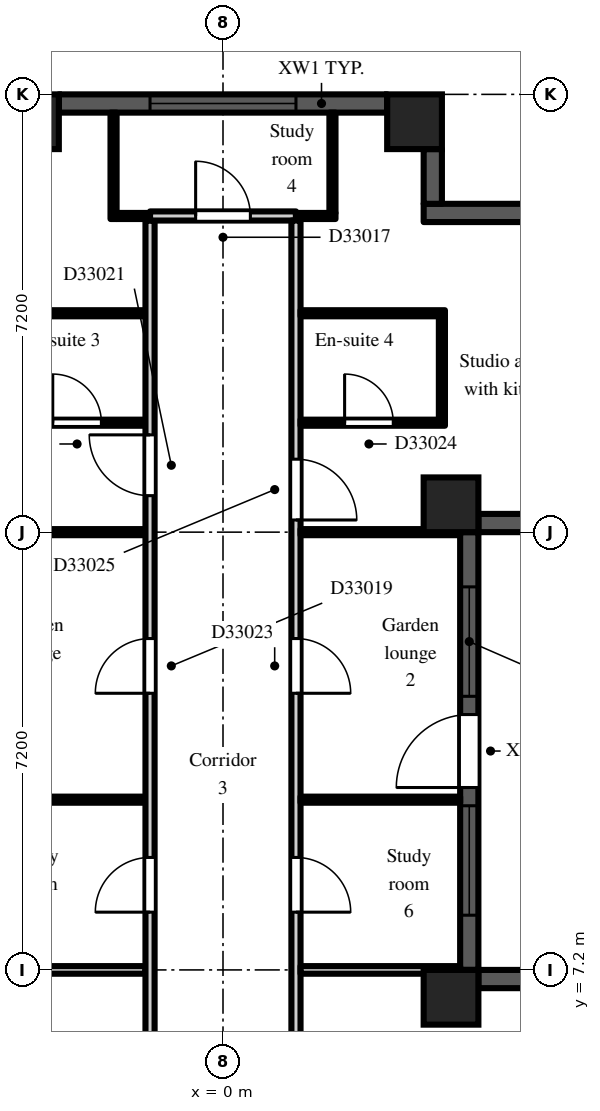
"""IFC4 building model, lengths in metres.
Left out: names, types, materials, properties, quantities, classifications, styles, units other than length and angle.
Written with IfcOpenShell. Run it as: python <this file> out.ifc"""

import sys

from ifc_helpers import new_model, si_unit, direction, frame, frame_2d, origin, origin_2d, place, context, subcontext, project, spatial, rectangle, extrude, element, fill, save


model = new_model("IFC4")
c1 = context("Model", 3, precision=1e-05, world=origin(), true_north=direction((0.0, 1.0)))
c2 = subcontext(c1, "Body", "Model", "MODEL_VIEW")
j1 = project(units=[si_unit("LENGTHUNIT", "METRE"), si_unit("PLANEANGLEUNIT", "RADIAN")], contexts=[c1])
p1 = place(None, origin())
s1 = spatial("IfcSite", under=j1, at=p1, CompositionType="ELEMENT")
p2 = place(p1, origin())
s2 = spatial("IfcBuilding", under=s1, at=p2, CompositionType="ELEMENT")
p3 = place(p2, frame((0.0, 0.0, 231.9)))
s3 = spatial("IfcBuildingStorey", under=s2, at=p3, CompositionType="ELEMENT", Elevation=231.9)
for number, where, z_axis, x_axis in (
    (1, (-3.15, 21.15, 0.0), (0.0, 0.0, 1.0), (1.0, 0.0, 0.0)),
    (2, (3.15, 21.15, 0.0), (0.0, 0.0, 1.0), (1.0, 0.0, 0.0)),
    (3, (3.75, 6.75, 0.0), (0.0, 0.0, 1.0), (1.0, 0.0, 0.0)),
    (4, (3.75, 14.85, 0.0), (0.0, 0.0, 1.0), (1.0, 0.0, 0.0)),
):
    element("IfcColumn", number, at=place(p3, frame(where, z_axis=z_axis, x_axis=x_axis)), inside=s3, PredefinedType="COLUMN", context=c2, shape_type="SweptSolid", body=[
        extrude(rectangle(XDim=0.9, YDim=0.9, at=origin_2d()), origin(), (0.0, 0.0, 1.0), 3.0),
    ])
p4 = place(p3, frame((7.2, 7.05, 0.0), z_axis=(0.0, 0.0, 1.0), x_axis=(-1.0, 0.0, 0.0)))
e5 = element("IfcWall", 5, at=p4, inside=s3, PredefinedType="SOLIDWALL", context=c2, shape_type="SweptSolid", body=[
    extrude(rectangle(XDim=3.0, YDim=0.3, at=frame_2d((1.5, 0.0))), origin(), (0.0, 0.0, 1.0), 2.3),
])
p5 = place(p3, frame((4.05, 7.2, 0.0), z_axis=(0.0, 0.0, 1.0), x_axis=(0.0, 1.0, 0.0)))
e6 = element("IfcWall", 6, at=p5, inside=s3, PredefinedType="SOLIDWALL", context=c2, shape_type="SweptSolid", body=[
    extrude(rectangle(XDim=7.2, YDim=0.3, at=frame_2d((3.6, 0.0))), origin(), (0.0, 0.0, 1.0), 2.3),
])
p6 = place(p5, frame((3.0, 0.0, 0.0)))
e7 = element("IfcOpeningElement", 7, at=p6, cuts=e6, PredefinedType="OPENING", context=c2, shape_type="SweptSolid", body=[
    extrude(rectangle(XDim=1.2, YDim=2.05, at=frame_2d((0.6, 1.025))), frame((0.0, 0.16, 0.0), z_axis=(0.0, -1.0, 0.0), x_axis=(1.0, 0.0, 0.0)), (0.0, 0.0, 1.0), 0.32),
])
p7 = place(p5, frame((0.9, 0.0, 0.2)))
e8 = element("IfcOpeningElement", 8, at=p7, cuts=e6, PredefinedType="OPENING", context=c2, shape_type="SweptSolid", body=[
    extrude(rectangle(XDim=1.8, YDim=1.85, at=frame_2d((0.9, 0.925))), frame((0.0, 0.16, 0.0), z_axis=(0.0, -1.0, 0.0), x_axis=(1.0, 0.0, 0.0)), (0.0, 0.0, 1.0), 0.32),
])
p8 = place(p5, frame((4.5, 0.0, 0.2)))
e9 = element("IfcOpeningElement", 9, at=p8, cuts=e6, PredefinedType="OPENING", context=c2, shape_type="SweptSolid", body=[
    extrude(rectangle(XDim=1.8, YDim=1.85, at=frame_2d((0.9, 0.925))), frame((0.0, 0.16, 0.0), z_axis=(0.0, -1.0, 0.0), x_axis=(1.0, 0.0, 0.0)), (0.0, 0.0, 1.0), 0.32),
])
p9 = place(p3, frame((4.2, 14.55, 0.0), z_axis=(0.0, 0.0, 1.0), x_axis=(1.0, 0.0, 0.0)))
e10 = element("IfcWall", 10, at=p9, inside=s3, PredefinedType="SOLIDWALL", context=c2, shape_type="SweptSolid", body=[
    extrude(rectangle(XDim=2.1, YDim=0.3, at=frame_2d((1.05, 0.0))), origin(), (0.0, 0.0, 1.0), 2.3),
])
p10 = place(p3, frame((5.1, 19.65, 0.0), z_axis=(0.0, 0.0, 1.0), x_axis=(-1.0, 0.0, 0.0)))
e11 = element("IfcWall", 11, at=p10, inside=s3, PredefinedType="SOLIDWALL", context=c2, shape_type="SweptSolid", body=[
    extrude(rectangle(XDim=1.8, YDim=0.3, at=frame_2d((0.9, 0.0))), origin(), (0.0, 0.0, 1.0), 2.6),
])
p11 = place(p3, frame((3.45, 19.8, 0.0), z_axis=(0.0, 0.0, 1.0), x_axis=(0.0, 1.0, 0.0)))
e12 = element("IfcWall", 12, at=p11, inside=s3, PredefinedType="SOLIDWALL", context=c2, shape_type="SweptSolid", body=[
    extrude(rectangle(XDim=0.9, YDim=0.3, at=frame_2d((0.45, 0.0))), origin(), (0.0, 0.0, 1.0), 2.6),
])
p12 = place(p3, frame((2.7, 21.45, 0.0), z_axis=(0.0, 0.0, 1.0), x_axis=(-1.0, 0.0, 0.0)))
e13 = element("IfcWall", 13, at=p12, inside=s3, PredefinedType="SOLIDWALL", context=c2, shape_type="SweptSolid", body=[
    extrude(rectangle(XDim=5.4, YDim=0.3, at=frame_2d((2.7, 0.0))), origin(), (0.0, 0.0, 1.0), 2.3),
])
p13 = place(p12, frame((1.5, 0.0, 0.2)))
e14 = element("IfcOpeningElement", 14, at=p13, cuts=e13, PredefinedType="OPENING", context=c2, shape_type="SweptSolid", body=[
    extrude(rectangle(XDim=2.4, YDim=1.85, at=frame_2d((1.2, 0.925))), frame((0.0, 0.16, 0.0), z_axis=(0.0, -1.0, 0.0), x_axis=(1.0, 0.0, 0.0)), (0.0, 0.0, 1.0), 0.32),
])
p14 = place(p3, frame((-3.9, 7.2, 0.0), z_axis=(0.0, 0.0, 1.0), x_axis=(1.0, 0.0, 0.0)))
e15 = element("IfcWall", 15, at=p14, inside=s3, PredefinedType="PARTITIONING", context=c2, shape_type="SweptSolid", body=[
    extrude(rectangle(XDim=2.625, YDim=0.125, at=frame_2d((1.312, 0.0))), origin(), (0.0, 0.0, 1.0), 2.6),
])
for number, where, z_axis, x_axis in (
    (16, (-3.9, 10.0, 0.0), (0.0, 0.0, 1.0), (1.0, 0.0, 0.0)),
    (17, (-3.9, 14.4, 0.0), (0.0, 0.0, 1.0), (1.0, 0.0, 0.0)),
):
    element("IfcWall", number, at=place(p3, frame(where, z_axis=z_axis, x_axis=x_axis)), inside=s3, PredefinedType="PARTITIONING", context=c2, shape_type="SweptSolid", body=[
        extrude(rectangle(XDim=2.625, YDim=0.1, at=frame_2d((1.312, 0.0))), origin(), (0.0, 0.0, 1.0), 2.6),
    ])
p15 = place(p3, frame((-3.55, 16.2, 0.0), z_axis=(0.0, 0.0, 1.0), x_axis=(1.0, 0.0, 0.0)))
e18 = element("IfcWall", 18, at=p15, inside=s3, PredefinedType="PARTITIONING", context=c2, shape_type="SweptSolid", body=[
    extrude(rectangle(XDim=2.275, YDim=0.1, at=frame_2d((1.138, 0.0))), origin(), (0.0, 0.0, 1.0), 2.6),
])
p16 = place(p15, frame((0.75, 0.0, 0.0)))
e19 = element("IfcOpeningElement", 19, at=p16, cuts=e18, PredefinedType="OPENING", context=c2, shape_type="SweptSolid", body=[
    extrude(rectangle(XDim=0.8, YDim=2.1, at=frame_2d((0.4, 1.05))), frame((0.0, 0.06, 0.0), z_axis=(0.0, -1.0, 0.0), x_axis=(1.0, 0.0, 0.0)), (0.0, 0.0, 1.0), 0.12),
])
p17 = place(p3, frame((-3.55, 18.0, 0.0), z_axis=(0.0, 0.0, 1.0), x_axis=(1.0, 0.0, 0.0)))
e20 = element("IfcWall", 20, at=p17, inside=s3, PredefinedType="PARTITIONING", context=c2, shape_type="SweptSolid", body=[
    extrude(rectangle(XDim=2.275, YDim=0.1, at=frame_2d((1.138, 0.0))), origin(), (0.0, 0.0, 1.0), 2.6),
])
p18 = place(p3, frame((-1.8, 19.55, 0.0), z_axis=(0.0, 0.0, 1.0), x_axis=(0.0, 1.0, 0.0)))
e21 = element("IfcWall", 21, at=p18, inside=s3, PredefinedType="PARTITIONING", context=c2, shape_type="SweptSolid", body=[
    extrude(rectangle(XDim=1.75, YDim=0.1, at=frame_2d((0.875, 0.0))), origin(), (0.0, 0.0, 1.0), 2.6),
])
p19 = place(p3, frame((-1.75, 19.6, 0.0), z_axis=(0.0, 0.0, 1.0), x_axis=(1.0, 0.0, 0.0)))
e22 = element("IfcWall", 22, at=p19, inside=s3, PredefinedType="PARTITIONING", context=c2, shape_type="SweptSolid", body=[
    extrude(rectangle(XDim=0.55, YDim=0.1, at=frame_2d((0.275, 0.0))), origin(), (0.0, 0.0, 1.0), 2.6),
])
p20 = place(p3, frame((-1.2, 1.275, 0.0), z_axis=(0.0, 0.0, 1.0), x_axis=(0.0, 1.0, 0.0)))
e23 = element("IfcWall", 23, at=p20, inside=s3, PredefinedType="PARTITIONING", context=c2, shape_type="SweptSolid", body=[
    extrude(rectangle(XDim=18.25, YDim=0.15, at=frame_2d((9.125, 0.0))), origin(), (0.0, 0.0, 1.0), 2.6),
])
p21 = place(p20, frame((0.675, 0.0, 0.0)))
e24 = element("IfcOpeningElement", 24, at=p21, cuts=e23, PredefinedType="OPENING", context=c2, shape_type="SweptSolid", body=[
    extrude(rectangle(XDim=0.9, YDim=2.1, at=frame_2d((0.45, 1.05))), frame((0.0, 0.085, 0.0), z_axis=(0.0, -1.0, 0.0), x_axis=(1.0, 0.0, 0.0)), (0.0, 0.0, 1.0), 0.17),
])
p22 = place(p20, frame((3.675, 0.0, 0.0)))
e25 = element("IfcOpeningElement", 25, at=p22, cuts=e23, PredefinedType="OPENING", context=c2, shape_type="SweptSolid", body=[
    extrude(rectangle(XDim=0.9, YDim=2.1, at=frame_2d((0.45, 1.05))), frame((0.0, 0.085, 0.0), z_axis=(0.0, -1.0, 0.0), x_axis=(1.0, 0.0, 0.0)), (0.0, 0.0, 1.0), 0.17),
])
p23 = place(p20, frame((6.875, 0.0, 0.0)))
e26 = element("IfcOpeningElement", 26, at=p23, cuts=e23, PredefinedType="OPENING", context=c2, shape_type="SweptSolid", body=[
    extrude(rectangle(XDim=0.9, YDim=2.1, at=frame_2d((0.45, 1.05))), frame((0.0, 0.085, 0.0), z_axis=(0.0, -1.0, 0.0), x_axis=(1.0, 0.0, 0.0)), (0.0, 0.0, 1.0), 0.17),
])
p24 = place(p20, frame((10.475, 0.0, 0.0)))
e27 = element("IfcOpeningElement", 27, at=p24, cuts=e23, PredefinedType="OPENING", context=c2, shape_type="SweptSolid", body=[
    extrude(rectangle(XDim=0.9, YDim=2.1, at=frame_2d((0.45, 1.05))), frame((0.0, 0.085, 0.0), z_axis=(0.0, -1.0, 0.0), x_axis=(1.0, 0.0, 0.0)), (0.0, 0.0, 1.0), 0.17),
])
p25 = place(p20, frame((13.725, 0.0, 0.0)))
e28 = element("IfcOpeningElement", 28, at=p25, cuts=e23, PredefinedType="OPENING", context=c2, shape_type="SweptSolid", body=[
    extrude(rectangle(XDim=1.0, YDim=2.1, at=frame_2d((0.5, 1.05))), frame((0.0, 0.085, 0.0), z_axis=(0.0, -1.0, 0.0), x_axis=(1.0, 0.0, 0.0)), (0.0, 0.0, 1.0), 0.17),
])
p26 = place(p3, frame((-1.2, 19.6, 0.0), z_axis=(0.0, 0.0, 1.0), x_axis=(1.0, 0.0, 0.0)))
e29 = element("IfcWall", 29, at=p26, inside=s3, PredefinedType="PARTITIONING", context=c2, shape_type="SweptSolid", body=[
    extrude(rectangle(XDim=2.4, YDim=0.15, at=frame_2d((1.2, 0.0))), origin(), (0.0, 0.0, 1.0), 2.6),
])
p27 = place(p26, frame((0.75, 0.0, 0.0)))
e30 = element("IfcOpeningElement", 30, at=p27, cuts=e29, PredefinedType="OPENING", context=c2, shape_type="SweptSolid", body=[
    extrude(rectangle(XDim=0.9, YDim=2.1, at=frame_2d((0.45, 1.05))), frame((0.0, 0.085, 0.0), z_axis=(0.0, -1.0, 0.0), x_axis=(1.0, 0.0, 0.0)), (0.0, 0.0, 1.0), 0.17),
])
p28 = place(p3, frame((1.2, 1.125, 0.0), z_axis=(0.0, 0.0, 1.0), x_axis=(0.0, 1.0, 0.0)))
e31 = element("IfcWall", 31, at=p28, inside=s3, PredefinedType="PARTITIONING", context=c2, shape_type="SweptSolid", body=[
    extrude(rectangle(XDim=18.4, YDim=0.15, at=frame_2d((9.2, 0.0))), origin(), (0.0, 0.0, 1.0), 2.6),
])
p29 = place(p28, frame((2.625, 0.0, 0.0)))
e32 = element("IfcOpeningElement", 32, at=p29, cuts=e31, PredefinedType="OPENING", context=c2, shape_type="SweptSolid", body=[
    extrude(rectangle(XDim=0.9, YDim=2.1, at=frame_2d((0.45, 1.05))), frame((0.0, 0.085, 0.0), z_axis=(0.0, -1.0, 0.0), x_axis=(1.0, 0.0, 0.0)), (0.0, 0.0, 1.0), 0.17),
])
p30 = place(p28, frame((7.025, 0.0, 0.0)))
e33 = element("IfcOpeningElement", 33, at=p30, cuts=e31, PredefinedType="OPENING", context=c2, shape_type="SweptSolid", body=[
    extrude(rectangle(XDim=0.9, YDim=2.1, at=frame_2d((0.45, 1.05))), frame((0.0, 0.085, 0.0), z_axis=(0.0, -1.0, 0.0), x_axis=(1.0, 0.0, 0.0)), (0.0, 0.0, 1.0), 0.17),
])
p31 = place(p28, frame((10.625, 0.0, 0.0)))
e34 = element("IfcOpeningElement", 34, at=p31, cuts=e31, PredefinedType="OPENING", context=c2, shape_type="SweptSolid", body=[
    extrude(rectangle(XDim=0.9, YDim=2.1, at=frame_2d((0.45, 1.05))), frame((0.0, 0.085, 0.0), z_axis=(0.0, -1.0, 0.0), x_axis=(1.0, 0.0, 0.0)), (0.0, 0.0, 1.0), 0.17),
])
p32 = place(p28, frame((13.475, 0.0, 0.0)))
e35 = element("IfcOpeningElement", 35, at=p32, cuts=e31, PredefinedType="OPENING", context=c2, shape_type="SweptSolid", body=[
    extrude(rectangle(XDim=1.0, YDim=2.1, at=frame_2d((0.5, 1.05))), frame((0.0, 0.085, 0.0), z_axis=(0.0, -1.0, 0.0), x_axis=(1.0, 0.0, 0.0)), (0.0, 0.0, 1.0), 0.17),
])
p33 = place(p3, frame((1.275, 7.2, 0.0), z_axis=(0.0, 0.0, 1.0), x_axis=(1.0, 0.0, 0.0)))
e36 = element("IfcWall", 36, at=p33, inside=s3, PredefinedType="PARTITIONING", context=c2, shape_type="SweptSolid", body=[
    extrude(rectangle(XDim=2.625, YDim=0.125, at=frame_2d((1.312, 0.0))), origin(), (0.0, 0.0, 1.0), 2.6),
])
for number, where, z_axis, x_axis in (
    (37, (1.275, 10.0, 0.0), (0.0, 0.0, 1.0), (1.0, 0.0, 0.0)),
    (38, (1.275, 14.4, 0.0), (0.0, 0.0, 1.0), (1.0, 0.0, 0.0)),
):
    element("IfcWall", number, at=place(p3, frame(where, z_axis=z_axis, x_axis=x_axis)), inside=s3, PredefinedType="PARTITIONING", context=c2, shape_type="SweptSolid", body=[
        extrude(rectangle(XDim=2.625, YDim=0.1, at=frame_2d((1.312, 0.0))), origin(), (0.0, 0.0, 1.0), 2.6),
    ])
p34 = place(p3, frame((1.275, 16.2, 0.0), z_axis=(0.0, 0.0, 1.0), x_axis=(1.0, 0.0, 0.0)))
e39 = element("IfcWall", 39, at=p34, inside=s3, PredefinedType="PARTITIONING", context=c2, shape_type="SweptSolid", body=[
    extrude(rectangle(XDim=2.375, YDim=0.1, at=frame_2d((1.188, 0.0))), origin(), (0.0, 0.0, 1.0), 2.6),
])
p35 = place(p34, frame((0.725, 0.0, 0.0)))
e40 = element("IfcOpeningElement", 40, at=p35, cuts=e39, PredefinedType="OPENING", context=c2, shape_type="SweptSolid", body=[
    extrude(rectangle(XDim=0.8, YDim=2.1, at=frame_2d((0.4, 1.05))), frame((0.0, 0.06, 0.0), z_axis=(0.0, -1.0, 0.0), x_axis=(1.0, 0.0, 0.0)), (0.0, 0.0, 1.0), 0.12),
])
p36 = place(p3, frame((1.275, 18.0, 0.0), z_axis=(0.0, 0.0, 1.0), x_axis=(1.0, 0.0, 0.0)))
e41 = element("IfcWall", 41, at=p36, inside=s3, PredefinedType="PARTITIONING", context=c2, shape_type="SweptSolid", body=[
    extrude(rectangle(XDim=2.375, YDim=0.1, at=frame_2d((1.188, 0.0))), origin(), (0.0, 0.0, 1.0), 2.6),
])
p37 = place(p3, frame((1.2, 19.6, 0.0), z_axis=(0.0, 0.0, 1.0), x_axis=(1.0, 0.0, 0.0)))
e42 = element("IfcWall", 42, at=p37, inside=s3, PredefinedType="PARTITIONING", context=c2, shape_type="SweptSolid", body=[
    extrude(rectangle(XDim=0.65, YDim=0.1, at=frame_2d((0.325, 0.0))), origin(), (0.0, 0.0, 1.0), 2.6),
])
p38 = place(p3, frame((1.8, 19.65, 0.0), z_axis=(0.0, 0.0, 1.0), x_axis=(0.0, 1.0, 0.0)))
e43 = element("IfcWall", 43, at=p38, inside=s3, PredefinedType="PARTITIONING", context=c2, shape_type="SweptSolid", body=[
    extrude(rectangle(XDim=1.65, YDim=0.1, at=frame_2d((0.825, 0.0))), origin(), (0.0, 0.0, 1.0), 2.6),
])
p39 = place(p3, frame((3.6, 16.25, 0.0), z_axis=(0.0, 0.0, 1.0), x_axis=(0.0, 1.0, 0.0)))
e44 = element("IfcWall", 44, at=p39, inside=s3, PredefinedType="PARTITIONING", context=c2, shape_type="SweptSolid", body=[
    extrude(rectangle(XDim=1.7, YDim=0.1, at=frame_2d((0.85, 0.0))), origin(), (0.0, 0.0, 1.0), 2.6),
])
p40 = place(p6, origin())
e45 = element("IfcDoor", 45, at=p40, inside=s3, OperationType="SINGLE_SWING_LEFT", PredefinedType="DOOR", context=c2, shape_type="SweptSolid", body=[
    extrude(rectangle(XDim=1.2, YDim=2.05, at=frame_2d((0.6, 1.025))), frame((0.0, 0.025, 0.0), z_axis=(0.0, -1.0, 0.0), x_axis=(1.0, 0.0, 0.0)), (0.0, 0.0, 1.0), 0.05),
])
fill(e7, e45)
p41 = place(p7, origin())
e46 = element("IfcWindow", 46, at=p41, inside=s3, PartitioningType="SINGLE_PANEL", PredefinedType="WINDOW", context=c2, shape_type="SweptSolid", body=[
    extrude(rectangle(XDim=1.8, YDim=1.85, at=frame_2d((0.9, 0.925))), frame((0.0, 0.03, 0.0), z_axis=(0.0, -1.0, 0.0), x_axis=(1.0, 0.0, 0.0)), (0.0, 0.0, 1.0), 0.06),
])
fill(e8, e46)
p42 = place(p8, origin())
e47 = element("IfcWindow", 47, at=p42, inside=s3, PartitioningType="SINGLE_PANEL", PredefinedType="WINDOW", context=c2, shape_type="SweptSolid", body=[
    extrude(rectangle(XDim=1.8, YDim=1.85, at=frame_2d((0.9, 0.925))), frame((0.0, 0.03, 0.0), z_axis=(0.0, -1.0, 0.0), x_axis=(1.0, 0.0, 0.0)), (0.0, 0.0, 1.0), 0.06),
])
fill(e9, e47)
p43 = place(p13, origin())
e48 = element("IfcWindow", 48, at=p43, inside=s3, PartitioningType="SINGLE_PANEL", PredefinedType="WINDOW", context=c2, shape_type="SweptSolid", body=[
    extrude(rectangle(XDim=2.4, YDim=1.85, at=frame_2d((1.2, 0.925))), frame((0.0, 0.03, 0.0), z_axis=(0.0, -1.0, 0.0), x_axis=(1.0, 0.0, 0.0)), (0.0, 0.0, 1.0), 0.06),
])
fill(e14, e48)
p44 = place(p27, origin())
e49 = element("IfcDoor", 49, at=p44, inside=s3, OperationType="SINGLE_SWING_LEFT", PredefinedType="DOOR", context=c2, shape_type="SweptSolid", body=[
    extrude(rectangle(XDim=0.9, YDim=2.1, at=frame_2d((0.45, 1.05))), frame((0.0, 0.025, 0.0), z_axis=(0.0, -1.0, 0.0), x_axis=(1.0, 0.0, 0.0)), (0.0, 0.0, 1.0), 0.05),
])
fill(e30, e49)
p45 = place(p23, origin())
e50 = element("IfcDoor", 50, at=p45, inside=s3, OperationType="SINGLE_SWING_LEFT", PredefinedType="DOOR", context=c2, shape_type="SweptSolid", body=[
    extrude(rectangle(XDim=0.9, YDim=2.1, at=frame_2d((0.45, 1.05))), frame((0.0, 0.025, 0.0), z_axis=(0.0, -1.0, 0.0), x_axis=(1.0, 0.0, 0.0)), (0.0, 0.0, 1.0), 0.05),
])
fill(e26, e50)
p46 = place(p24, origin())
e51 = element("IfcDoor", 51, at=p46, inside=s3, OperationType="SINGLE_SWING_LEFT", PredefinedType="DOOR", context=c2, shape_type="SweptSolid", body=[
    extrude(rectangle(XDim=0.9, YDim=2.1, at=frame_2d((0.45, 1.05))), frame((0.0, 0.025, 0.0), z_axis=(0.0, -1.0, 0.0), x_axis=(1.0, 0.0, 0.0)), (0.0, 0.0, 1.0), 0.05),
])
fill(e27, e51)
p47 = place(p16, origin())
e52 = element("IfcDoor", 52, at=p47, inside=s3, OperationType="SINGLE_SWING_LEFT", PredefinedType="DOOR", context=c2, shape_type="SweptSolid", body=[
    extrude(rectangle(XDim=0.8, YDim=2.1, at=frame_2d((0.4, 1.05))), frame((0.0, 0.025, 0.0), z_axis=(0.0, -1.0, 0.0), x_axis=(1.0, 0.0, 0.0)), (0.0, 0.0, 1.0), 0.05),
])
fill(e19, e52)
p48 = place(p25, origin())
e53 = element("IfcDoor", 53, at=p48, inside=s3, OperationType="SINGLE_SWING_RIGHT", PredefinedType="DOOR", context=c2, shape_type="SweptSolid", body=[
    extrude(rectangle(XDim=1.0, YDim=2.1, at=frame_2d((0.5, 1.05))), frame((0.0, 0.025, 0.0), z_axis=(0.0, -1.0, 0.0), x_axis=(1.0, 0.0, 0.0)), (0.0, 0.0, 1.0), 0.05),
])
fill(e28, e53)
p49 = place(p30, frame((0.9, 0.0, 0.0), z_axis=(0.0, 0.0, 1.0), x_axis=(-1.0, 0.0, 0.0)))
e54 = element("IfcDoor", 54, at=p49, inside=s3, OperationType="SINGLE_SWING_RIGHT", PredefinedType="DOOR", context=c2, shape_type="SweptSolid", body=[
    extrude(rectangle(XDim=0.9, YDim=2.1, at=frame_2d((0.45, 1.05))), frame((0.0, 0.025, 0.0), z_axis=(0.0, -1.0, 0.0), x_axis=(1.0, 0.0, 0.0)), (0.0, 0.0, 1.0), 0.05),
])
fill(e33, e54)
p50 = place(p31, frame((0.9, 0.0, 0.0), z_axis=(0.0, 0.0, 1.0), x_axis=(-1.0, 0.0, 0.0)))
e55 = element("IfcDoor", 55, at=p50, inside=s3, OperationType="SINGLE_SWING_RIGHT", PredefinedType="DOOR", context=c2, shape_type="SweptSolid", body=[
    extrude(rectangle(XDim=0.9, YDim=2.1, at=frame_2d((0.45, 1.05))), frame((0.0, 0.025, 0.0), z_axis=(0.0, -1.0, 0.0), x_axis=(1.0, 0.0, 0.0)), (0.0, 0.0, 1.0), 0.05),
])
fill(e34, e55)
p51 = place(p35, origin())
e56 = element("IfcDoor", 56, at=p51, inside=s3, OperationType="SINGLE_SWING_LEFT", PredefinedType="DOOR", context=c2, shape_type="SweptSolid", body=[
    extrude(rectangle(XDim=0.8, YDim=2.1, at=frame_2d((0.4, 1.05))), frame((0.0, 0.025, 0.0), z_axis=(0.0, -1.0, 0.0), x_axis=(1.0, 0.0, 0.0)), (0.0, 0.0, 1.0), 0.05),
])
fill(e40, e56)
p52 = place(p32, frame((1.0, 0.0, 0.0), z_axis=(0.0, 0.0, 1.0), x_axis=(-1.0, 0.0, 0.0)))
e57 = element("IfcDoor", 57, at=p52, inside=s3, OperationType="SINGLE_SWING_RIGHT", PredefinedType="DOOR", context=c2, shape_type="SweptSolid", body=[
    extrude(rectangle(XDim=1.0, YDim=2.1, at=frame_2d((0.5, 1.05))), frame((0.0, 0.025, 0.0), z_axis=(0.0, -1.0, 0.0), x_axis=(1.0, 0.0, 0.0)), (0.0, 0.0, 1.0), 0.05),
])
fill(e35, e57)
save(model, sys.argv[1])
